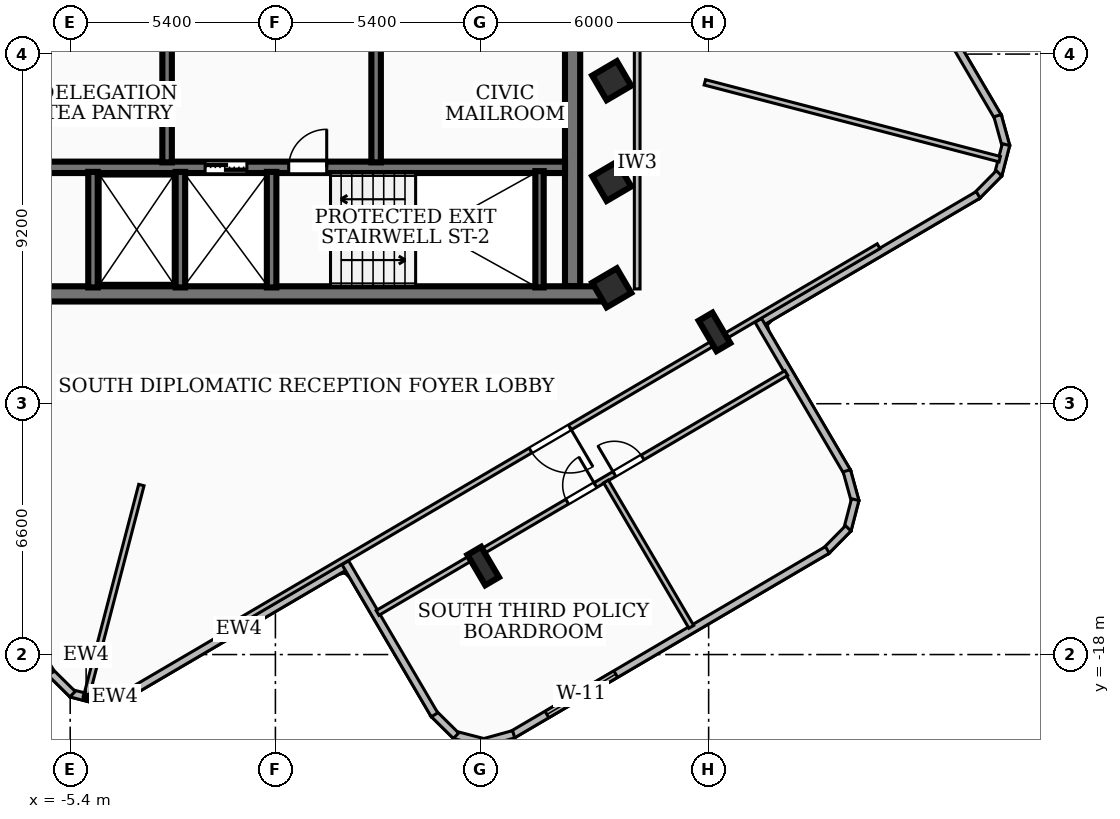
"""IFC4 building model, lengths in metres.
Left out: names, types, materials, properties, quantities, classifications, styles, units other than length and angle.
Written with IfcOpenShell. Run it as: python <this file> out.ifc"""

import sys

from ifc_helpers import new_model, si_unit, direction, frame, frame_2d, origin, origin_2d, place, context, subcontext, project, spatial, rectangle, i_section, extrude, element, fill, save


model = new_model("IFC4")
c1 = context("Model", 3, precision=1e-05, world=origin(), true_north=direction((0.0, 1.0)))
c2 = subcontext(c1, "Body", "Model", "MODEL_VIEW")
j1 = project(units=[si_unit("LENGTHUNIT", "METRE"), si_unit("PLANEANGLEUNIT", "RADIAN")], contexts=[c1])
p1 = place(None, origin())
s1 = spatial("IfcSite", under=j1, at=p1, CompositionType="ELEMENT")
p2 = place(p1, origin())
s2 = spatial("IfcBuilding", under=s1, at=p2, CompositionType="ELEMENT")
p3 = place(p2, frame((0.0, 0.0, 212.04)))
s3 = spatial("IfcBuildingStorey", under=s2, at=p3, CompositionType="ELEMENT", Elevation=212.04)
p4 = place(p3, frame((8.78, -8.51, 0.0), z_axis=(0.0, 0.0, 1.0), x_axis=(-1.0, 0.0, 0.0)))
e1 = element("IfcWall", 1, at=p4, inside=s3, PredefinedType="SHEAR", context=c2, shape_type="SweptSolid", body=[
    extrude(rectangle(XDim=17.56, YDim=0.4, at=frame_2d((8.78, 0.0))), origin(), (0.0, 0.0, 1.0), 3.16),
])
p5 = place(p3, frame((7.82, -1.95, 0.0), z_axis=(0.0, 0.0, 1.0), x_axis=(0.0, -1.0, 0.0)))
e2 = element("IfcWall", 2, at=p5, inside=s3, PredefinedType="SHEAR", context=c2, shape_type="SweptSolid", body=[
    extrude(rectangle(XDim=6.36, YDim=0.4, at=frame_2d((3.18, 0.0))), origin(), (0.0, 0.0, 1.0), 3.16),
])
p6 = place(p3, frame((-7.62, -5.18, 0.0), z_axis=(0.0, 0.0, 1.0), x_axis=(1.0, 0.0, 0.0)))
e3 = element("IfcWall", 3, at=p6, inside=s3, PredefinedType="SOLIDWALL", context=c2, shape_type="SweptSolid", body=[
    extrude(rectangle(XDim=15.24, YDim=0.3, at=frame_2d((7.62, 0.0))), origin(), (0.0, 0.0, 1.0), 3.16),
])
p7 = place(p6, frame((5.77, 0.0, 0.0)))
e4 = element("IfcOpeningElement", 4, at=p7, cuts=e3, PredefinedType="OPENING", context=c2, shape_type="SweptSolid", body=[
    extrude(rectangle(XDim=1.1, YDim=2.15, at=frame_2d((0.55, 1.075))), frame((0.0, 0.16, 0.0), z_axis=(0.0, -1.0, 0.0), x_axis=(1.0, 0.0, 0.0)), (0.0, 0.0, 1.0), 0.32),
])
p8 = place(p6, frame((7.97, 0.0, 0.0)))
e5 = element("IfcOpeningElement", 5, at=p8, cuts=e3, PredefinedType="OPENING", context=c2, shape_type="SweptSolid", body=[
    extrude(rectangle(XDim=1.0, YDim=2.1, at=frame_2d((0.5, 1.05))), frame((0.0, 0.16, 0.0), z_axis=(0.0, -1.0, 0.0), x_axis=(1.0, 0.0, 0.0)), (0.0, 0.0, 1.0), 0.32),
])
p9 = place(p3, frame((6.95, -8.34, 0.0), z_axis=(0.0, 0.0, 1.0), x_axis=(0.0, 1.0, 0.0)))
e6 = element("IfcWall", 6, at=p9, inside=s3, PredefinedType="SOLIDWALL", context=c2, shape_type="SweptSolid", body=[
    extrude(rectangle(XDim=3.06, YDim=0.22, at=frame_2d((1.53, 0.0))), origin(), (0.0, 0.0, 1.0), 3.16),
])
for number, where, z_axis, x_axis in (
    (7, (-0.1, -8.34, 0.0), (0.0, 0.0, 1.0), (0.0, 1.0, 0.0)),
    (8, (-2.5, -8.34, 0.0), (0.0, 0.0, 1.0), (0.0, 1.0, 0.0)),
    (9, (-4.8, -8.34, 0.0), (0.0, 0.0, 1.0), (0.0, 1.0, 0.0)),
):
    element("IfcWall", number, at=place(p3, frame(where, z_axis=z_axis, x_axis=x_axis)), inside=s3, PredefinedType="SOLIDWALL", context=c2, shape_type="SweptSolid", body=[
        extrude(rectangle(XDim=3.04, YDim=0.25, at=frame_2d((1.52, 0.0))), origin(), (0.0, 0.0, 1.0), 3.16),
    ])
for number, where, z_axis, x_axis in (
    (10, (-2.85, -5.05, 0.0), (0.0, 0.0, 1.0), (0.0, 1.0, 0.0)),
    (11, (2.65, -5.05, 0.0), (0.0, 0.0, 1.0), (0.0, 1.0, 0.0)),
):
    element("IfcWall", number, at=place(p3, frame(where, z_axis=z_axis, x_axis=x_axis)), inside=s3, PredefinedType="SOLIDWALL", context=c2, shape_type="SweptSolid", body=[
        extrude(rectangle(XDim=3.07, YDim=0.25, at=frame_2d((1.535, 0.0))), origin(), (0.0, 0.0, 1.0), 3.16),
    ])
for number, where, z_axis, x_axis in (
    (12, (8.85, -5.55, 0.0), (0.0, 0.0, 1.0), (0.863, 0.506, 0.0)),
    (13, (8.85, -2.9, 0.0), (0.0, 0.0, 1.0), (0.863, 0.506, 0.0)),
    (14, (8.85, -8.35, 0.0), (0.0, 0.0, 1.0), (0.863, 0.506, 0.0)),
):
    element("IfcColumn", number, at=place(p3, frame(where, z_axis=z_axis, x_axis=x_axis)), inside=s3, PredefinedType="COLUMN", context=c2, shape_type="SweptSolid", body=[
        extrude(rectangle(XDim=0.75, YDim=0.75, at=origin_2d()), origin(), (0.0, 0.0, 1.0), 3.42),
    ])
for number, where, z_axis, x_axis in (
    (15, (5.468, -15.671, 0.0), (0.0, 0.0, 1.0), (0.863, 0.506, 0.0)),
    (16, (11.554, -9.51, 0.0), (0.0, 0.0, 1.0), (0.863, 0.506, 0.0)),
):
    element("IfcColumn", number, at=place(p3, frame(where, z_axis=z_axis, x_axis=x_axis)), inside=s3, PredefinedType="COLUMN", context=c2, shape_type="SweptSolid", body=[
        extrude(i_section(OverallWidth=0.418, OverallDepth=0.927, WebThickness=0.019, FlangeThickness=0.032, at=origin_2d()), origin(), (0.0, 0.0, 1.0), 3.42),
    ])
p10 = place(p3, frame((1.948, -15.612, 0.0), z_axis=(0.0, 0.0, 1.0), x_axis=(-0.86259717351, -0.505891407569, 0.0)))
e17 = element("IfcWall", 17, at=p10, inside=s3, PredefinedType="SOLIDWALL", context=c2, shape_type="SweptSolid", body=[
    extrude(rectangle(XDim=6.742, YDim=0.2, at=frame_2d((3.371, 0.0))), origin(), (0.0, 0.0, 1.0), 3.16),
])
p11 = place(p3, frame((-3.822, -19.003, 0.0), z_axis=(0.0, 0.0, 1.0), x_axis=(-0.963905015631, -0.266246353668, 0.0)))
e18 = element("IfcWall", 18, at=p11, inside=s3, PredefinedType="SOLIDWALL", context=c2, shape_type="SweptSolid", body=[
    extrude(rectangle(XDim=0.838, YDim=0.2, at=frame_2d((0.419, 0.0))), origin(), (0.0, 0.0, 1.0), 3.16),
])
p12 = place(p3, frame((-4.582, -19.225, 0.0), z_axis=(0.0, 0.0, 1.0), x_axis=(-0.967943577658, 0.251167733737, 0.0)))
e19 = element("IfcWall", 19, at=p12, inside=s3, PredefinedType="SOLIDWALL", context=c2, shape_type="SweptSolid", body=[
    extrude(rectangle(XDim=0.824, YDim=0.2, at=frame_2d((0.412, 0.0))), origin(), (0.0, 0.0, 1.0), 3.16),
])
p13 = place(p3, frame((-5.338, -19.042, 0.0), z_axis=(0.0, 0.0, 1.0), x_axis=(-0.711310891957, 0.702877524881, 0.0)))
e20 = element("IfcWall", 20, at=p13, inside=s3, PredefinedType="SOLIDWALL", context=c2, shape_type="SweptSolid", body=[
    extrude(rectangle(XDim=0.84, YDim=0.2, at=frame_2d((0.42, 0.0))), origin(), (0.0, 0.0, 1.0), 3.16),
])
p14 = place(p3, frame((-5.904, -18.492, 0.0), z_axis=(0.0, 0.0, 1.0), x_axis=(-0.506046465446, 0.862506217258, 0.0)))
e21 = element("IfcWall", 21, at=p14, inside=s3, PredefinedType="SOLIDWALL", context=c2, shape_type="SweptSolid", body=[
    extrude(rectangle(XDim=25.924, YDim=0.2, at=frame_2d((12.962, 0.0))), origin(), (0.0, 0.0, 1.0), 3.16),
])
p15 = place(p14, frame((0.85, 0.0, 0.85)))
e22 = element("IfcOpeningElement", 22, at=p15, cuts=e21, PredefinedType="OPENING", context=c2, shape_type="SweptSolid", body=[
    extrude(rectangle(XDim=2.4, YDim=1.85, at=frame_2d((1.2, 0.925))), frame((0.0, 0.11, 0.0), z_axis=(0.0, -1.0, 0.0), x_axis=(1.0, 0.0, 0.0)), (0.0, 0.0, 1.0), 0.22),
])
p16 = place(p3, frame((15.611, 1.948, 0.0), z_axis=(0.0, 0.0, 1.0), x_axis=(0.505999167705, -0.862533965872, 0.0)))
e23 = element("IfcWall", 23, at=p16, inside=s3, PredefinedType="SOLIDWALL", context=c2, shape_type="SweptSolid", body=[
    extrude(rectangle(XDim=6.743, YDim=0.2, at=frame_2d((3.372, 0.0))), origin(), (0.0, 0.0, 1.0), 3.16),
])
p17 = place(p3, frame((19.003, -3.822, 0.0), z_axis=(0.0, 0.0, 1.0), x_axis=(0.266246353668, -0.963905015631, 0.0)))
e24 = element("IfcWall", 24, at=p17, inside=s3, PredefinedType="SOLIDWALL", context=c2, shape_type="SweptSolid", body=[
    extrude(rectangle(XDim=0.838, YDim=0.2, at=frame_2d((0.419, 0.0))), origin(), (0.0, 0.0, 1.0), 3.16),
])
p18 = place(p3, frame((19.225, -4.582, 0.0), z_axis=(0.0, 0.0, 1.0), x_axis=(-0.251167733737, -0.967943577658, 0.0)))
e25 = element("IfcWall", 25, at=p18, inside=s3, PredefinedType="SOLIDWALL", context=c2, shape_type="SweptSolid", body=[
    extrude(rectangle(XDim=0.824, YDim=0.2, at=frame_2d((0.412, 0.0))), origin(), (0.0, 0.0, 1.0), 3.16),
])
p19 = place(p3, frame((19.042, -5.338, 0.0), z_axis=(0.0, 0.0, 1.0), x_axis=(-0.702877524881, -0.711310891957, 0.0)))
e26 = element("IfcWall", 26, at=p19, inside=s3, PredefinedType="SOLIDWALL", context=c2, shape_type="SweptSolid", body=[
    extrude(rectangle(XDim=0.84, YDim=0.2, at=frame_2d((0.42, 0.0))), origin(), (0.0, 0.0, 1.0), 3.16),
])
p20 = place(p3, frame((18.492, -5.904, 0.0), z_axis=(0.0, 0.0, 1.0), x_axis=(-0.86245977502, -0.506125613333, 0.0)))
e27 = element("IfcWall", 27, at=p20, inside=s3, PredefinedType="SOLIDWALL", context=c2, shape_type="SweptSolid", body=[
    extrude(rectangle(XDim=6.741, YDim=0.2, at=frame_2d((3.371, 0.0))), origin(), (0.0, 0.0, 1.0), 3.16),
])
p21 = place(p3, frame((12.707, -9.207, 0.0), z_axis=(0.0, 0.0, 1.0), x_axis=(0.505936854923, -0.862570518178, 0.0)))
e28 = element("IfcWall", 28, at=p21, inside=s3, PredefinedType="SOLIDWALL", context=c2, shape_type="SweptSolid", body=[
    extrude(rectangle(XDim=4.641, YDim=0.2, at=frame_2d((2.32, 0.0))), origin(), (0.0, 0.0, 1.0), 3.16),
])
p22 = place(p3, frame((15.035, -13.164, 0.0), z_axis=(0.0, 0.0, 1.0), x_axis=(0.266246353668, -0.963905015631, 0.0)))
e29 = element("IfcWall", 29, at=p22, inside=s3, PredefinedType="SOLIDWALL", context=c2, shape_type="SweptSolid", body=[
    extrude(rectangle(XDim=0.838, YDim=0.2, at=frame_2d((0.419, 0.0))), origin(), (0.0, 0.0, 1.0), 3.16),
])
p23 = place(p3, frame((15.257, -13.924, 0.0), z_axis=(0.0, 0.0, 1.0), x_axis=(-0.251167733737, -0.967943577658, 0.0)))
e30 = element("IfcWall", 30, at=p23, inside=s3, PredefinedType="SOLIDWALL", context=c2, shape_type="SweptSolid", body=[
    extrude(rectangle(XDim=0.824, YDim=0.2, at=frame_2d((0.412, 0.0))), origin(), (0.0, 0.0, 1.0), 3.16),
])
p24 = place(p3, frame((15.074, -14.68, 0.0), z_axis=(0.0, 0.0, 1.0), x_axis=(-0.702877524881, -0.711310891957, 0.0)))
e31 = element("IfcWall", 31, at=p24, inside=s3, PredefinedType="SOLIDWALL", context=c2, shape_type="SweptSolid", body=[
    extrude(rectangle(XDim=0.84, YDim=0.2, at=frame_2d((0.42, 0.0))), origin(), (0.0, 0.0, 1.0), 3.16),
])
p25 = place(p3, frame((14.524, -15.246, 0.0), z_axis=(0.0, 0.0, 1.0), x_axis=(-0.862483422861, -0.506085314241, 0.0)))
e32 = element("IfcWall", 32, at=p25, inside=s3, PredefinedType="SOLIDWALL", context=c2, shape_type="SweptSolid", body=[
    extrude(rectangle(XDim=9.625, YDim=0.2, at=frame_2d((4.812, 0.0))), origin(), (0.0, 0.0, 1.0), 3.16),
])
p26 = place(p25, frame((6.457, 0.0, 0.85)))
e33 = element("IfcOpeningElement", 33, at=p26, cuts=e32, PredefinedType="OPENING", context=c2, shape_type="SweptSolid", body=[
    extrude(rectangle(XDim=2.1, YDim=1.6, at=frame_2d((1.05, 0.8))), frame((0.0, 0.11, 0.0), z_axis=(0.0, -1.0, 0.0), x_axis=(1.0, 0.0, 0.0)), (0.0, 0.0, 1.0), 0.22),
])
p27 = place(p3, frame((6.269, -20.097, 0.0), z_axis=(0.0, 0.0, 1.0), x_axis=(-0.963925656212, -0.266171616247, 0.0)))
e34 = element("IfcWall", 34, at=p27, inside=s3, PredefinedType="SOLIDWALL", context=c2, shape_type="SweptSolid", body=[
    extrude(rectangle(XDim=0.838, YDim=0.2, at=frame_2d((0.419, 0.0))), origin(), (0.0, 0.0, 1.0), 3.16),
])
p28 = place(p3, frame((5.509, -20.319, 0.0), z_axis=(0.0, 0.0, 1.0), x_axis=(-0.967962254737, 0.251095745493, 0.0)))
e35 = element("IfcWall", 35, at=p28, inside=s3, PredefinedType="SOLIDWALL", context=c2, shape_type="SweptSolid", body=[
    extrude(rectangle(XDim=0.824, YDim=0.2, at=frame_2d((0.412, 0.0))), origin(), (0.0, 0.0, 1.0), 3.16),
])
p29 = place(p3, frame((4.753, -20.136, 0.0), z_axis=(0.0, 0.0, 1.0), x_axis=(-0.711167178618, 0.70302293281, 0.0)))
e36 = element("IfcWall", 36, at=p29, inside=s3, PredefinedType="SOLIDWALL", context=c2, shape_type="SweptSolid", body=[
    extrude(rectangle(XDim=0.839, YDim=0.2, at=frame_2d((0.42, 0.0))), origin(), (0.0, 0.0, 1.0), 3.16),
])
p30 = place(p3, frame((4.187, -19.586, 0.0), z_axis=(0.0, 0.0, 1.0), x_axis=(-0.505936854923, 0.862570518178, 0.0)))
e37 = element("IfcWall", 37, at=p30, inside=s3, PredefinedType="SOLIDWALL", context=c2, shape_type="SweptSolid", body=[
    extrude(rectangle(XDim=4.641, YDim=0.2, at=frame_2d((2.32, 0.0))), origin(), (0.0, 0.0, 1.0), 3.16),
])
p31 = place(p3, frame((9.52, -8.38, 0.0), z_axis=(0.0, 0.0, 1.0), x_axis=(0.0, 1.0, 0.0)))
e38 = element("IfcWall", 38, at=p31, inside=s3, PredefinedType="PARTITIONING", context=c2, shape_type="SweptSolid", body=[
    extrude(rectangle(XDim=6.63, YDim=0.15, at=frame_2d((3.315, 0.0))), origin(), (0.0, 0.0, 1.0), 3.16),
])
p32 = place(p3, frame((-3.527, -13.54, 0.0), z_axis=(0.0, 0.0, 1.0), x_axis=(-0.252132617321, -0.967692690519, 0.0)))
e39 = element("IfcWall", 39, at=p32, inside=s3, PredefinedType="PARTITIONING", context=c2, shape_type="SweptSolid", body=[
    extrude(rectangle(XDim=5.703, YDim=0.145, at=frame_2d((2.852, 0.0))), origin(), (0.0, 0.0, 1.0), 3.16),
])
p33 = place(p3, frame((11.3, -2.944, 0.0), z_axis=(0.0, 0.0, 1.0), x_axis=(0.967711624716, -0.252059936106, 0.0)))
e40 = element("IfcWall", 40, at=p33, inside=s3, PredefinedType="PARTITIONING", context=c2, shape_type="SweptSolid", body=[
    extrude(rectangle(XDim=8.018, YDim=0.145, at=frame_2d((4.009, 0.0))), origin(), (0.0, 0.0, 1.0), 3.16),
])
p34 = place(p3, frame((15.873, -7.255, 0.0), z_axis=(0.0, 0.0, 1.0), x_axis=(-0.862498672631, -0.506059324299, 0.0)))
e41 = element("IfcWall", 41, at=p34, inside=s3, PredefinedType="PARTITIONING", context=c2, shape_type="SweptSolid", body=[
    extrude(rectangle(XDim=20.039, YDim=0.145, at=frame_2d((10.02, 0.0))), origin(), (0.0, 0.0, 1.0), 2.53),
])
p35 = place(p34, frame((9.42, 0.0, 0.0)))
e42 = element("IfcOpeningElement", 42, at=p35, cuts=e41, PredefinedType="OPENING", context=c2, shape_type="SweptSolid", body=[
    extrude(rectangle(XDim=1.2, YDim=2.1, at=frame_2d((0.6, 1.05))), frame((0.0, 0.083, 0.0), z_axis=(0.0, -1.0, 0.0), x_axis=(1.0, 0.0, 0.0)), (0.0, 0.0, 1.0), 0.165),
])
p36 = place(p3, frame((8.7, -13.446, 0.0), z_axis=(0.0, 0.0, 1.0), x_axis=(0.506043007476, -0.862508246097, 0.0)))
e43 = element("IfcWall", 43, at=p36, inside=s3, PredefinedType="PARTITIONING", context=c2, shape_type="SweptSolid", body=[
    extrude(rectangle(XDim=4.435, YDim=0.145, at=frame_2d((2.217, 0.0))), origin(), (0.0, 0.0, 1.0), 3.16),
])
p37 = place(p3, frame((2.688, -16.904, 0.0), z_axis=(0.0, 0.0, 1.0), x_axis=(0.862497334811, 0.506061604396, 0.0)))
e44 = element("IfcWall", 44, at=p37, inside=s3, PredefinedType="PARTITIONING", context=c2, shape_type="SweptSolid", body=[
    extrude(rectangle(XDim=12.471, YDim=0.145, at=frame_2d((6.235, 0.0))), origin(), (0.0, 0.0, 1.0), 2.53),
])
p38 = place(p37, frame((5.785, 0.0, 0.0)))
e45 = element("IfcOpeningElement", 45, at=p38, cuts=e44, PredefinedType="OPENING", context=c2, shape_type="SweptSolid", body=[
    extrude(rectangle(XDim=0.86, YDim=2.04, at=frame_2d((0.43, 1.02))), frame((0.0, 0.083, 0.0), z_axis=(0.0, -1.0, 0.0), x_axis=(1.0, 0.0, 0.0)), (0.0, 0.0, 1.0), 0.165),
])
p39 = place(p37, frame((7.225, 0.0, 0.0)))
e46 = element("IfcOpeningElement", 46, at=p39, cuts=e44, PredefinedType="OPENING", context=c2, shape_type="SweptSolid", body=[
    extrude(rectangle(XDim=0.86, YDim=2.04, at=frame_2d((0.43, 1.02))), frame((0.0, 0.083, 0.0), z_axis=(0.0, -1.0, 0.0), x_axis=(1.0, 0.0, 0.0)), (0.0, 0.0, 1.0), 0.165),
])
p40 = place(p26, origin())
e47 = element("IfcWindow", 47, at=p40, inside=s3, PartitioningType="SINGLE_PANEL", PredefinedType="WINDOW", context=c2, shape_type="SweptSolid", body=[
    extrude(rectangle(XDim=2.1, YDim=1.6, at=frame_2d((1.05, 0.8))), frame((0.0, 0.03, 0.0), z_axis=(0.0, -1.0, 0.0), x_axis=(1.0, 0.0, 0.0)), (0.0, 0.0, 1.0), 0.06),
])
fill(e33, e47)
p41 = place(p7, origin())
e48 = element("IfcDoor", 48, at=p41, inside=s3, OperationType="DOUBLE_DOOR_SLIDING", PredefinedType="DOOR", context=c2, shape_type="SweptSolid", body=[
    extrude(rectangle(XDim=1.1, YDim=2.15, at=frame_2d((0.55, 1.075))), frame((0.0, 0.025, 0.0), z_axis=(0.0, -1.0, 0.0), x_axis=(1.0, 0.0, 0.0)), (0.0, 0.0, 1.0), 0.05),
])
fill(e4, e48)
p42 = place(p8, origin())
e49 = element("IfcDoor", 49, at=p42, inside=s3, OperationType="SINGLE_SWING_RIGHT", PredefinedType="DOOR", context=c2, shape_type="SweptSolid", body=[
    extrude(rectangle(XDim=1.0, YDim=2.1, at=frame_2d((0.5, 1.05))), frame((0.0, 0.025, 0.0), z_axis=(0.0, -1.0, 0.0), x_axis=(1.0, 0.0, 0.0)), (0.0, 0.0, 1.0), 0.05),
])
fill(e5, e49)
p43 = place(p35, origin())
e50 = element("IfcDoor", 50, at=p43, inside=s3, OperationType="SINGLE_SWING_LEFT", PredefinedType="DOOR", context=c2, shape_type="SweptSolid", body=[
    extrude(rectangle(XDim=1.2, YDim=2.1, at=frame_2d((0.6, 1.05))), frame((0.0, 0.025, 0.0), z_axis=(0.0, -1.0, 0.0), x_axis=(1.0, 0.0, 0.0)), (0.0, 0.0, 1.0), 0.05),
])
fill(e42, e50)
p44 = place(p38, origin())
e51 = element("IfcDoor", 51, at=p44, inside=s3, OperationType="SINGLE_SWING_RIGHT", PredefinedType="DOOR", context=c2, shape_type="SweptSolid", body=[
    extrude(rectangle(XDim=0.86, YDim=2.04, at=frame_2d((0.43, 1.02))), frame((0.0, 0.025, 0.0), z_axis=(0.0, -1.0, 0.0), x_axis=(1.0, 0.0, 0.0)), (0.0, 0.0, 1.0), 0.05),
])
fill(e45, e51)
p45 = place(p39, origin())
e52 = element("IfcDoor", 52, at=p45, inside=s3, OperationType="SINGLE_SWING_LEFT", PredefinedType="DOOR", context=c2, shape_type="SweptSolid", body=[
    extrude(rectangle(XDim=0.86, YDim=2.04, at=frame_2d((0.43, 1.02))), frame((0.0, 0.025, 0.0), z_axis=(0.0, -1.0, 0.0), x_axis=(1.0, 0.0, 0.0)), (0.0, 0.0, 1.0), 0.05),
])
fill(e46, e52)
save(model, sys.argv[1])
